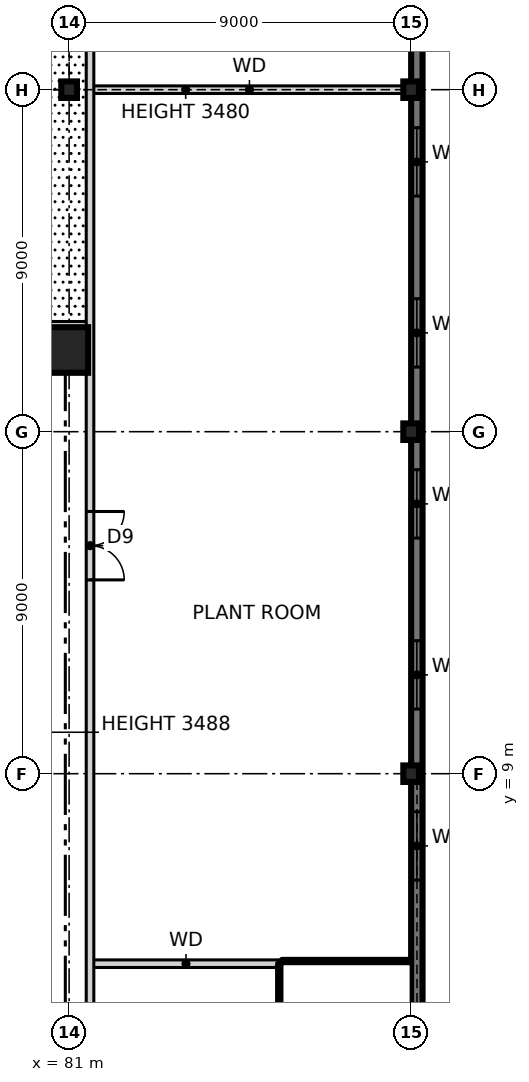
"""IFC4 building model, lengths in metres.
Left out: names, types, materials, properties, quantities, classifications, styles, units other than length and angle.
Written with IfcOpenShell. Run it as: python <this file> out.ifc"""

import sys

from ifc_helpers import new_model, si_unit, direction, frame, frame_2d, origin, origin_2d, place, context, subcontext, project, spatial, rectangle, hollow_rectangle, i_section, extrude, element, fill, save


model = new_model("IFC4")
c1 = context("Model", 3, precision=1e-05, world=origin(), true_north=direction((0.0, 1.0)))
c2 = subcontext(c1, "Body", "Model", "MODEL_VIEW")
j1 = project(units=[si_unit("LENGTHUNIT", "METRE"), si_unit("PLANEANGLEUNIT", "RADIAN")], contexts=[c1])
p1 = place(None, origin())
s1 = spatial("IfcSite", under=j1, at=p1, CompositionType="ELEMENT")
p2 = place(p1, origin())
s2 = spatial("IfcBuilding", under=s1, at=p2, CompositionType="ELEMENT")
p3 = place(p2, frame((0.0, 0.0, 6.0)))
s3 = spatial("IfcBuildingStorey", under=s2, at=p3, CompositionType="ELEMENT", Elevation=6.0)
p4 = place(p3, frame((80.9, 20.15, 0.0), z_axis=(0.0, 0.0, 1.0), x_axis=(1.0, 0.0, 0.0)))
e1 = element("IfcColumn", 1, at=p4, inside=s3, PredefinedType="COLUMN", context=c2, shape_type="SweptSolid", body=[
    extrude(hollow_rectangle(XDim=1.2, YDim=1.2, WallThickness=0.07, at=origin_2d()), origin(), (0.0, 0.0, 1.0), 4.5),
])
for number, where, z_axis, x_axis in (
    (2, (81.0, 27.0, 0.0), (0.0, 0.0, 1.0), (1.0, 0.0, 0.0)),
    (3, (90.0, 9.0, 0.0), (0.0, 0.0, 1.0), (1.0, 0.0, 0.0)),
    (4, (90.0, 18.0, 0.0), (0.0, 0.0, 1.0), (1.0, 0.0, 0.0)),
    (5, (90.0, 27.0, 0.0), (0.0, 0.0, 1.0), (1.0, 0.0, 0.0)),
):
    element("IfcColumn", number, at=place(p3, frame(where, z_axis=z_axis, x_axis=x_axis)), inside=s3, PredefinedType="COLUMN", context=c2, shape_type="SweptSolid", body=[
        extrude(i_section(OverallWidth=0.411, OverallDepth=0.434, WebThickness=0.036, FlangeThickness=0.057, at=origin_2d()), origin(), (0.0, 0.0, 1.0), 4.5),
    ])
p5 = place(p3, frame((90.15, -36.3, -0.25), z_axis=(0.0, 0.0, 1.0), x_axis=(0.0, 1.0, 0.0)))
e6 = element("IfcWall", 6, at=p5, inside=s3, PredefinedType="SOLIDWALL", context=c2, shape_type="SweptSolid", body=[
    extrude(rectangle(XDim=72.6, YDim=0.3, at=frame_2d((36.3, 0.0))), origin(), (0.0, 0.0, 1.0), 3.73),
])
p6 = place(p5, frame((2.0, 0.0, 1.15)))
e7 = element("IfcOpeningElement", 7, at=p6, cuts=e6, PredefinedType="OPENING", context=c2, shape_type="SweptSolid", body=[
    extrude(rectangle(XDim=1.8, YDim=2.4, at=frame_2d((0.9, 1.2))), frame((0.0, 0.16, 0.0), z_axis=(0.0, -1.0, 0.0), x_axis=(1.0, 0.0, 0.0)), (0.0, 0.0, 1.0), 0.32),
])
p7 = place(p5, frame((6.5, 0.0, 1.15)))
e8 = element("IfcOpeningElement", 8, at=p7, cuts=e6, PredefinedType="OPENING", context=c2, shape_type="SweptSolid", body=[
    extrude(rectangle(XDim=1.8, YDim=2.4, at=frame_2d((0.9, 1.2))), frame((0.0, 0.16, 0.0), z_axis=(0.0, -1.0, 0.0), x_axis=(1.0, 0.0, 0.0)), (0.0, 0.0, 1.0), 0.32),
])
p8 = place(p5, frame((11.0, 0.0, 1.15)))
e9 = element("IfcOpeningElement", 9, at=p8, cuts=e6, PredefinedType="OPENING", context=c2, shape_type="SweptSolid", body=[
    extrude(rectangle(XDim=1.8, YDim=2.4, at=frame_2d((0.9, 1.2))), frame((0.0, 0.16, 0.0), z_axis=(0.0, -1.0, 0.0), x_axis=(1.0, 0.0, 0.0)), (0.0, 0.0, 1.0), 0.32),
])
p9 = place(p5, frame((15.5, 0.0, 1.15)))
e10 = element("IfcOpeningElement", 10, at=p9, cuts=e6, PredefinedType="OPENING", context=c2, shape_type="SweptSolid", body=[
    extrude(rectangle(XDim=1.8, YDim=2.4, at=frame_2d((0.9, 1.2))), frame((0.0, 0.16, 0.0), z_axis=(0.0, -1.0, 0.0), x_axis=(1.0, 0.0, 0.0)), (0.0, 0.0, 1.0), 0.32),
])
p10 = place(p5, frame((20.0, 0.0, 1.15)))
e11 = element("IfcOpeningElement", 11, at=p10, cuts=e6, PredefinedType="OPENING", context=c2, shape_type="SweptSolid", body=[
    extrude(rectangle(XDim=1.8, YDim=2.4, at=frame_2d((0.9, 1.2))), frame((0.0, 0.16, 0.0), z_axis=(0.0, -1.0, 0.0), x_axis=(1.0, 0.0, 0.0)), (0.0, 0.0, 1.0), 0.32),
])
p11 = place(p5, frame((24.5, 0.0, 1.15)))
e12 = element("IfcOpeningElement", 12, at=p11, cuts=e6, PredefinedType="OPENING", context=c2, shape_type="SweptSolid", body=[
    extrude(rectangle(XDim=1.8, YDim=2.4, at=frame_2d((0.9, 1.2))), frame((0.0, 0.16, 0.0), z_axis=(0.0, -1.0, 0.0), x_axis=(1.0, 0.0, 0.0)), (0.0, 0.0, 1.0), 0.32),
])
p12 = place(p5, frame((29.0, 0.0, 1.15)))
e13 = element("IfcOpeningElement", 13, at=p12, cuts=e6, PredefinedType="OPENING", context=c2, shape_type="SweptSolid", body=[
    extrude(rectangle(XDim=1.8, YDim=2.4, at=frame_2d((0.9, 1.2))), frame((0.0, 0.16, 0.0), z_axis=(0.0, -1.0, 0.0), x_axis=(1.0, 0.0, 0.0)), (0.0, 0.0, 1.0), 0.32),
])
p13 = place(p5, frame((42.5, 0.0, 1.15)))
e14 = element("IfcOpeningElement", 14, at=p13, cuts=e6, PredefinedType="OPENING", context=c2, shape_type="SweptSolid", body=[
    extrude(rectangle(XDim=1.8, YDim=2.4, at=frame_2d((0.9, 1.2))), frame((0.0, 0.16, 0.0), z_axis=(0.0, -1.0, 0.0), x_axis=(1.0, 0.0, 0.0)), (0.0, 0.0, 1.0), 0.32),
])
p14 = place(p5, frame((47.0, 0.0, 1.15)))
e15 = element("IfcOpeningElement", 15, at=p14, cuts=e6, PredefinedType="OPENING", context=c2, shape_type="SweptSolid", body=[
    extrude(rectangle(XDim=1.8, YDim=2.4, at=frame_2d((0.9, 1.2))), frame((0.0, 0.16, 0.0), z_axis=(0.0, -1.0, 0.0), x_axis=(1.0, 0.0, 0.0)), (0.0, 0.0, 1.0), 0.32),
])
p15 = place(p5, frame((51.5, 0.0, 1.15)))
e16 = element("IfcOpeningElement", 16, at=p15, cuts=e6, PredefinedType="OPENING", context=c2, shape_type="SweptSolid", body=[
    extrude(rectangle(XDim=1.8, YDim=2.4, at=frame_2d((0.9, 1.2))), frame((0.0, 0.16, 0.0), z_axis=(0.0, -1.0, 0.0), x_axis=(1.0, 0.0, 0.0)), (0.0, 0.0, 1.0), 0.32),
])
p16 = place(p5, frame((56.0, 0.0, 1.15)))
e17 = element("IfcOpeningElement", 17, at=p16, cuts=e6, PredefinedType="OPENING", context=c2, shape_type="SweptSolid", body=[
    extrude(rectangle(XDim=1.8, YDim=2.4, at=frame_2d((0.9, 1.2))), frame((0.0, 0.16, 0.0), z_axis=(0.0, -1.0, 0.0), x_axis=(1.0, 0.0, 0.0)), (0.0, 0.0, 1.0), 0.32),
])
p17 = place(p5, frame((60.5, 0.0, 1.15)))
e18 = element("IfcOpeningElement", 18, at=p17, cuts=e6, PredefinedType="OPENING", context=c2, shape_type="SweptSolid", body=[
    extrude(rectangle(XDim=1.8, YDim=2.4, at=frame_2d((0.9, 1.2))), frame((0.0, 0.16, 0.0), z_axis=(0.0, -1.0, 0.0), x_axis=(1.0, 0.0, 0.0)), (0.0, 0.0, 1.0), 0.32),
])
p18 = place(p5, frame((65.0, 0.0, 1.15)))
e19 = element("IfcOpeningElement", 19, at=p18, cuts=e6, PredefinedType="OPENING", context=c2, shape_type="SweptSolid", body=[
    extrude(rectangle(XDim=1.8, YDim=2.4, at=frame_2d((0.9, 1.2))), frame((0.0, 0.16, 0.0), z_axis=(0.0, -1.0, 0.0), x_axis=(1.0, 0.0, 0.0)), (0.0, 0.0, 1.0), 0.32),
])
p19 = place(p5, frame((69.5, 0.0, 1.15)))
e20 = element("IfcOpeningElement", 20, at=p19, cuts=e6, PredefinedType="OPENING", context=c2, shape_type="SweptSolid", body=[
    extrude(rectangle(XDim=1.8, YDim=2.4, at=frame_2d((0.9, 1.2))), frame((0.0, 0.16, 0.0), z_axis=(0.0, -1.0, 0.0), x_axis=(1.0, 0.0, 0.0)), (0.0, 0.0, 1.0), 0.32),
])
p20 = place(p3, frame((81.55, 4.0, 0.0), z_axis=(0.0, 0.0, 1.0), x_axis=(1.0, 0.0, 0.0)))
e21 = element("IfcWall", 21, at=p20, inside=s3, PredefinedType="SOLIDWALL", context=c2, shape_type="SweptSolid", body=[
    extrude(rectangle(XDim=5.05, YDim=0.2, at=frame_2d((2.525, 0.0))), origin(), (0.0, 0.0, 1.0), 4.25),
])
p21 = place(p3, frame((86.6, 4.0, 0.0), z_axis=(0.0, 0.0, 1.0), x_axis=(1.0, 0.0, 0.0)))
e22 = element("IfcWall", 22, at=p21, inside=s3, PredefinedType="SOLIDWALL", context=c2, shape_type="SweptSolid", body=[
    extrude(rectangle(XDim=3.34, YDim=0.2, at=frame_2d((1.67, 0.0))), origin(), (0.0, 0.0, 1.0), 4.5),
])
p22 = place(p3, frame((44.45, 20.8, 0.0), z_axis=(0.0, 0.0, 1.0), x_axis=(1.0, 0.0, 0.0)))
e23 = element("IfcWall", 23, at=p22, inside=s3, PredefinedType="SOLIDWALL", context=c2, shape_type="SweptSolid", body=[
    extrude(rectangle(XDim=37.1, YDim=0.2, at=frame_2d((18.55, 0.0))), origin(), (0.0, 0.0, 1.0), 4.25),
])
p23 = place(p22, frame((9.325, 0.0, 0.0)))
e24 = element("IfcOpeningElement", 24, at=p23, cuts=e23, PredefinedType="OPENING", context=c2, shape_type="SweptSolid", body=[
    extrude(rectangle(XDim=1.8, YDim=2.1, at=frame_2d((0.9, 1.05))), frame((0.0, 0.11, 0.0), z_axis=(0.0, -1.0, 0.0), x_axis=(1.0, 0.0, 0.0)), (0.0, 0.0, 1.0), 0.22),
])
p24 = place(p22, frame((31.125, 0.0, 0.0)))
e25 = element("IfcOpeningElement", 25, at=p24, cuts=e23, PredefinedType="OPENING", context=c2, shape_type="SweptSolid", body=[
    extrude(rectangle(XDim=1.8, YDim=2.1, at=frame_2d((0.9, 1.05))), frame((0.0, 0.11, 0.0), z_axis=(0.0, -1.0, 0.0), x_axis=(1.0, 0.0, 0.0)), (0.0, 0.0, 1.0), 0.22),
])
p25 = place(p22, frame((19.35, 0.0, 0.0)))
e26 = element("IfcOpeningElement", 26, at=p25, cuts=e23, PredefinedType="OPENING", context=c2, shape_type="SweptSolid", body=[
    extrude(rectangle(XDim=1.8, YDim=2.1, at=frame_2d((0.9, 1.05))), frame((0.0, 0.11, 0.0), z_axis=(0.0, -1.0, 0.0), x_axis=(1.0, 0.0, 0.0)), (0.0, 0.0, 1.0), 0.22),
])
p26 = place(p3, frame((81.55, 27.0, 0.0), z_axis=(0.0, 0.0, 1.0), x_axis=(1.0, 0.0, 0.0)))
e27 = element("IfcWall", 27, at=p26, inside=s3, PredefinedType="SOLIDWALL", context=c2, shape_type="SweptSolid", body=[
    extrude(rectangle(XDim=8.39, YDim=0.2, at=frame_2d((4.195, 0.0))), origin(), (0.0, 0.0, 1.0), 3.48),
])
p27 = place(p3, frame((86.6, -3.4, 0.0), z_axis=(0.0, 0.0, 1.0), x_axis=(0.0, 1.0, 0.0)))
e28 = element("IfcWall", 28, at=p27, inside=s3, PredefinedType="SOLIDWALL", context=c2, shape_type="SweptSolid", body=[
    extrude(rectangle(XDim=7.4, YDim=0.2, at=frame_2d((3.7, 0.0))), origin(), (0.0, 0.0, 1.0), 4.5),
])
p28 = place(p27, frame((0.35, 0.0, 0.0)))
e29 = element("IfcOpeningElement", 29, at=p28, cuts=e28, PredefinedType="OPENING", context=c2, shape_type="SweptSolid", body=[
    extrude(rectangle(XDim=1.0, YDim=2.1, at=frame_2d((0.5, 1.05))), frame((0.0, 0.11, 0.0), z_axis=(0.0, -1.0, 0.0), x_axis=(1.0, 0.0, 0.0)), (0.0, 0.0, 1.0), 0.22),
])
p29 = place(p3, frame((81.55, -36.05, 0.0), z_axis=(0.0, 0.0, 1.0), x_axis=(0.0, 1.0, 0.0)))
e30 = element("IfcWall", 30, at=p29, inside=s3, PredefinedType="SOLIDWALL", context=c2, shape_type="SweptSolid", body=[
    extrude(rectangle(XDim=72.1, YDim=0.2, at=frame_2d((36.05, 0.0))), origin(), (0.0, 0.0, 1.0), 4.25),
])
p30 = place(p29, frame((66.65, 0.0, 0.0)))
e31 = element("IfcOpeningElement", 31, at=p30, cuts=e30, PredefinedType="OPENING", context=c2, shape_type="SweptSolid", body=[
    extrude(rectangle(XDim=1.8, YDim=2.1, at=frame_2d((0.9, 1.05))), frame((0.0, 0.11, 0.0), z_axis=(0.0, -1.0, 0.0), x_axis=(1.0, 0.0, 0.0)), (0.0, 0.0, 1.0), 0.22),
])
p31 = place(p29, frame((25.6, 0.0, 0.0)))
e32 = element("IfcOpeningElement", 32, at=p31, cuts=e30, PredefinedType="OPENING", context=c2, shape_type="SweptSolid", body=[
    extrude(rectangle(XDim=1.8, YDim=2.1, at=frame_2d((0.9, 1.05))), frame((0.0, 0.11, 0.0), z_axis=(0.0, -1.0, 0.0), x_axis=(1.0, 0.0, 0.0)), (0.0, 0.0, 1.0), 0.22),
])
p32 = place(p29, frame((35.45, 0.0, 0.0)))
e33 = element("IfcOpeningElement", 33, at=p32, cuts=e30, PredefinedType="OPENING", context=c2, shape_type="SweptSolid", body=[
    extrude(rectangle(XDim=1.8, YDim=2.1, at=frame_2d((0.9, 1.05))), frame((0.0, 0.11, 0.0), z_axis=(0.0, -1.0, 0.0), x_axis=(1.0, 0.0, 0.0)), (0.0, 0.0, 1.0), 0.22),
])
p33 = place(p29, frame((50.15, 0.0, 0.0)))
e34 = element("IfcOpeningElement", 34, at=p33, cuts=e30, PredefinedType="OPENING", context=c2, shape_type="SweptSolid", body=[
    extrude(rectangle(XDim=1.8, YDim=2.1, at=frame_2d((0.9, 1.05))), frame((0.0, 0.11, 0.0), z_axis=(0.0, -1.0, 0.0), x_axis=(1.0, 0.0, 0.0)), (0.0, 0.0, 1.0), 0.22),
])
p34 = place(p13, origin())
e35 = element("IfcWindow", 35, at=p34, inside=s3, PartitioningType="SINGLE_PANEL", PredefinedType="WINDOW", context=c2, shape_type="SweptSolid", body=[
    extrude(rectangle(XDim=1.8, YDim=2.4, at=frame_2d((0.9, 1.2))), frame((0.0, 0.03, 0.0), z_axis=(0.0, -1.0, 0.0), x_axis=(1.0, 0.0, 0.0)), (0.0, 0.0, 1.0), 0.06),
])
fill(e14, e35)
p35 = place(p14, origin())
e36 = element("IfcWindow", 36, at=p35, inside=s3, PartitioningType="SINGLE_PANEL", PredefinedType="WINDOW", context=c2, shape_type="SweptSolid", body=[
    extrude(rectangle(XDim=1.8, YDim=2.4, at=frame_2d((0.9, 1.2))), frame((0.0, 0.03, 0.0), z_axis=(0.0, -1.0, 0.0), x_axis=(1.0, 0.0, 0.0)), (0.0, 0.0, 1.0), 0.06),
])
fill(e15, e36)
p36 = place(p15, origin())
e37 = element("IfcWindow", 37, at=p36, inside=s3, PartitioningType="SINGLE_PANEL", PredefinedType="WINDOW", context=c2, shape_type="SweptSolid", body=[
    extrude(rectangle(XDim=1.8, YDim=2.4, at=frame_2d((0.9, 1.2))), frame((0.0, 0.03, 0.0), z_axis=(0.0, -1.0, 0.0), x_axis=(1.0, 0.0, 0.0)), (0.0, 0.0, 1.0), 0.06),
])
fill(e16, e37)
p37 = place(p16, origin())
e38 = element("IfcWindow", 38, at=p37, inside=s3, PartitioningType="SINGLE_PANEL", PredefinedType="WINDOW", context=c2, shape_type="SweptSolid", body=[
    extrude(rectangle(XDim=1.8, YDim=2.4, at=frame_2d((0.9, 1.2))), frame((0.0, 0.03, 0.0), z_axis=(0.0, -1.0, 0.0), x_axis=(1.0, 0.0, 0.0)), (0.0, 0.0, 1.0), 0.06),
])
fill(e17, e38)
p38 = place(p17, origin())
e39 = element("IfcWindow", 39, at=p38, inside=s3, PartitioningType="SINGLE_PANEL", PredefinedType="WINDOW", context=c2, shape_type="SweptSolid", body=[
    extrude(rectangle(XDim=1.8, YDim=2.4, at=frame_2d((0.9, 1.2))), frame((0.0, 0.03, 0.0), z_axis=(0.0, -1.0, 0.0), x_axis=(1.0, 0.0, 0.0)), (0.0, 0.0, 1.0), 0.06),
])
fill(e18, e39)
p39 = place(p33, frame((1.8, 0.0, 0.0), z_axis=(0.0, 0.0, 1.0), x_axis=(-1.0, 0.0, 0.0)))
e40 = element("IfcDoor", 40, at=p39, inside=s3, OperationType="DOUBLE_DOOR_SINGLE_SWING", PredefinedType="DOOR", context=c2, shape_type="SweptSolid", body=[
    extrude(rectangle(XDim=1.8, YDim=2.1, at=frame_2d((0.9, 1.05))), frame((0.0, 0.025, 0.0), z_axis=(0.0, -1.0, 0.0), x_axis=(1.0, 0.0, 0.0)), (0.0, 0.0, 1.0), 0.05),
])
fill(e34, e40)
save(model, sys.argv[1])
